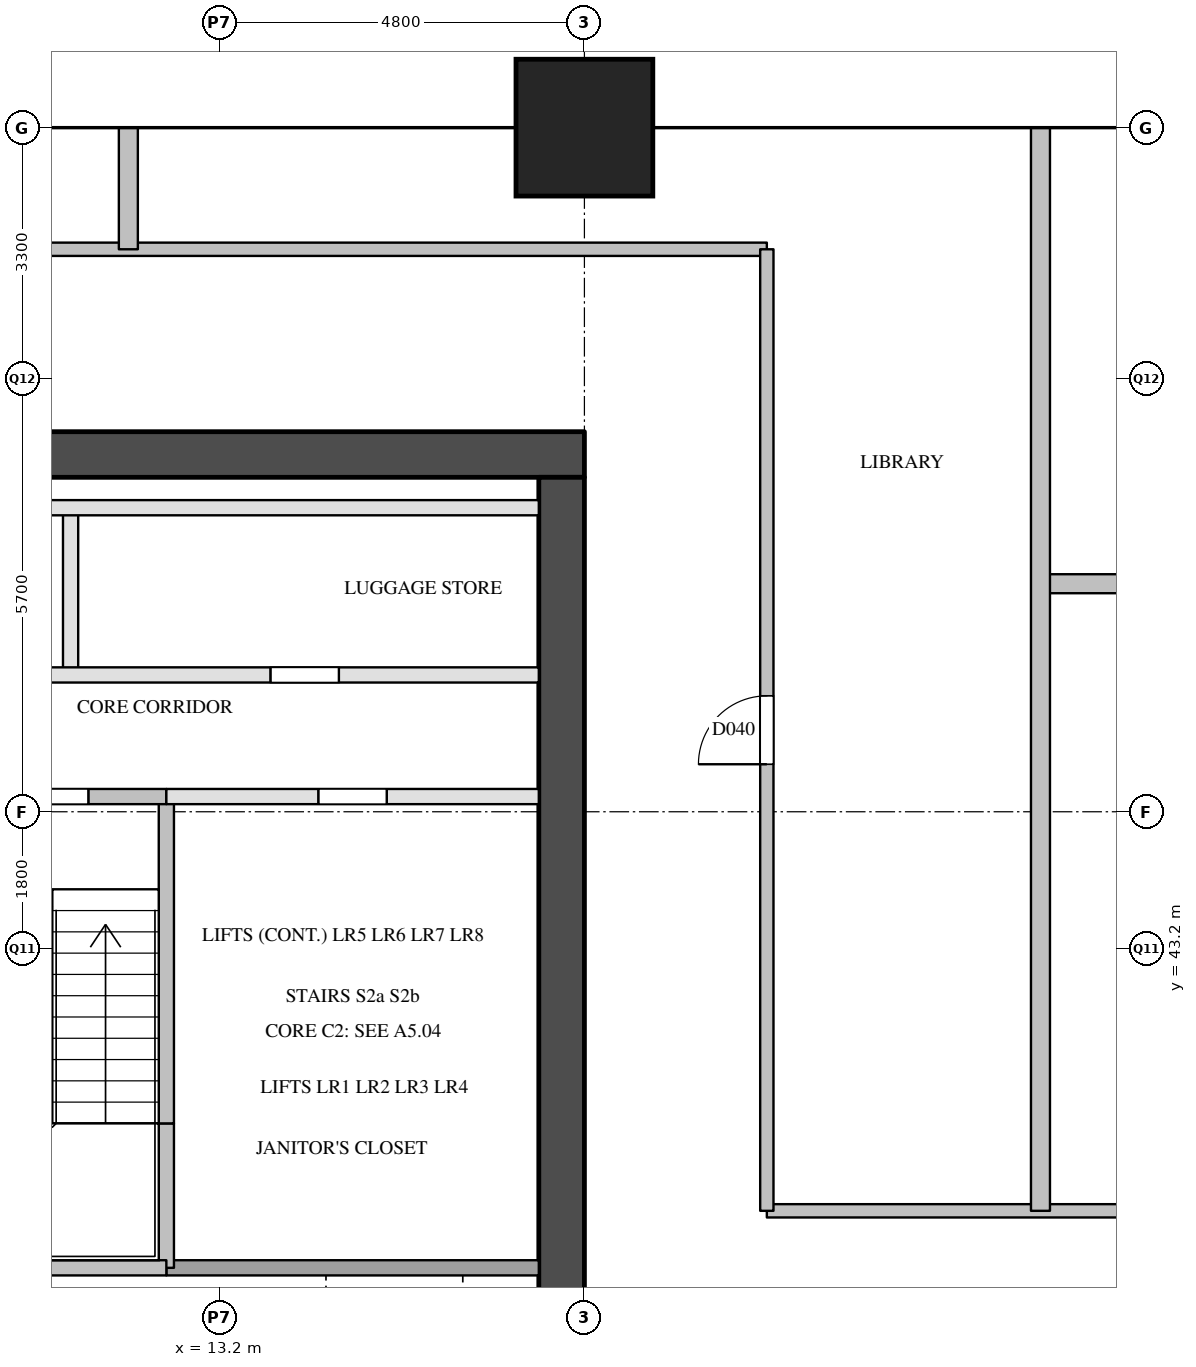
"""IFC4 building model, lengths in metres.
Left out: names, types, materials, properties, quantities, classifications, styles, units other than length and angle.
Written with IfcOpenShell. Run it as: python <this file> out.ifc"""

import sys

from ifc_helpers import new_model, si_unit, direction, frame, frame_2d, origin, origin_2d, place, context, subcontext, project, spatial, rectangle, extrude, element, fill, save


model = new_model("IFC4")
c1 = context("Model", 3, precision=1e-05, world=origin(), true_north=direction((0.0, 1.0)))
c2 = subcontext(c1, "Body", "Model", "MODEL_VIEW")
j1 = project(units=[si_unit("LENGTHUNIT", "METRE"), si_unit("PLANEANGLEUNIT", "RADIAN")], contexts=[c1])
p1 = place(None, origin())
s1 = spatial("IfcSite", under=j1, at=p1, CompositionType="ELEMENT")
p2 = place(p1, origin())
s2 = spatial("IfcBuilding", under=s1, at=p2, CompositionType="ELEMENT")
p3 = place(p2, frame((0.0, 0.0, 38.6)))
s3 = spatial("IfcBuildingStorey", under=s2, at=p3, CompositionType="ELEMENT", Elevation=38.6)
p4 = place(p3, frame((18.0, 54.0, 0.0), z_axis=(0.0, 0.0, 1.0), x_axis=(1.0, 0.0, 0.0)))
e1 = element("IfcColumn", 1, at=p4, inside=s3, PredefinedType="COLUMN", context=c2, shape_type="SweptSolid", body=[
    extrude(rectangle(XDim=1.8, YDim=1.8, at=origin_2d()), origin(), (0.0, 0.0, 1.0), 3.8),
])
p5 = place(p3, frame((5.6, 49.7, 0.0), z_axis=(0.0, 0.0, 1.0), x_axis=(1.0, 0.0, 0.0)))
e2 = element("IfcWall", 2, at=p5, inside=s3, PredefinedType="SHEAR", context=c2, shape_type="SweptSolid", body=[
    extrude(rectangle(XDim=12.4, YDim=0.6, at=frame_2d((6.2, 0.0))), origin(), (0.0, 0.0, 1.0), 3.5),
])
p6 = place(p3, frame((17.7, 29.1, 0.0), z_axis=(0.0, 0.0, 1.0), x_axis=(0.0, 1.0, 0.0)))
e3 = element("IfcWall", 3, at=p6, inside=s3, PredefinedType="SHEAR", context=c2, shape_type="SweptSolid", body=[
    extrude(rectangle(XDim=20.3, YDim=0.6, at=frame_2d((10.15, 0.0))), origin(), (0.0, 0.0, 1.0), 3.5),
])
p7 = place(p6, frame((1.25, 0.0, 0.0)))
e4 = element("IfcOpeningElement", 4, at=p7, cuts=e3, PredefinedType="OPENING", context=c2, shape_type="SweptSolid", body=[
    extrude(rectangle(XDim=0.7, YDim=2.1, at=frame_2d((0.35, 1.05))), frame((0.0, 0.31, 0.0), z_axis=(0.0, -1.0, 0.0), x_axis=(1.0, 0.0, 0.0)), (0.0, 0.0, 1.0), 0.62),
])
p8 = place(p6, frame((7.05, 0.0, 0.0)))
e5 = element("IfcOpeningElement", 5, at=p8, cuts=e3, PredefinedType="OPENING", context=c2, shape_type="SweptSolid", body=[
    extrude(rectangle(XDim=0.7, YDim=2.1, at=frame_2d((0.35, 1.05))), frame((0.0, 0.31, 0.0), z_axis=(0.0, -1.0, 0.0), x_axis=(1.0, 0.0, 0.0)), (0.0, 0.0, 1.0), 0.62),
])
p9 = place(p3, frame((11.24, 46.8, 0.0), z_axis=(0.0, 0.0, 1.0), x_axis=(0.0, 1.0, 0.0)))
e6 = element("IfcWall", 6, at=p9, inside=s3, PredefinedType="PARTITIONING", context=c2, shape_type="SweptSolid", body=[
    extrude(rectangle(XDim=2.2, YDim=0.2, at=frame_2d((1.1, 0.0))), origin(), (0.0, 0.0, 1.0), 3.5),
])
p10 = place(p3, frame((12.5, 39.0, 0.0), z_axis=(0.0, 0.0, 1.0), x_axis=(0.0, 1.0, 0.0)))
e7 = element("IfcWall", 7, at=p10, inside=s3, PredefinedType="SOLIDWALL", context=c2, shape_type="SweptSolid", body=[
    extrude(rectangle(XDim=1.9, YDim=0.2, at=frame_2d((0.95, 0.0))), origin(), (0.0, 0.0, 1.0), 3.5),
])
p11 = place(p3, frame((12.5, 40.9, 0.0), z_axis=(0.0, 0.0, 1.0), x_axis=(0.0, 1.0, 0.0)))
e8 = element("IfcWall", 8, at=p11, inside=s3, PredefinedType="SOLIDWALL", context=c2, shape_type="SweptSolid", body=[
    extrude(rectangle(XDim=4.3, YDim=0.2, at=frame_2d((2.15, 0.0))), origin(), (0.0, 0.0, 1.0), 3.5),
])
p12 = place(p3, frame((12.5, 39.0, 0.0), z_axis=(0.0, 0.0, 1.0), x_axis=(1.0, 0.0, 0.0)))
e9 = element("IfcWall", 9, at=p12, inside=s3, PredefinedType="SOLIDWALL", context=c2, shape_type="SweptSolid", body=[
    extrude(rectangle(XDim=4.9, YDim=0.2, at=frame_2d((2.45, 0.0))), origin(), (0.0, 0.0, 1.0), 3.5),
])
p13 = place(p3, frame((9.45, 39.0, 0.0), z_axis=(0.0, 0.0, 1.0), x_axis=(1.0, 0.0, 0.0)))
e10 = element("IfcWall", 10, at=p13, inside=s3, PredefinedType="SOLIDWALL", context=c2, shape_type="SweptSolid", body=[
    extrude(rectangle(XDim=3.05, YDim=0.2, at=frame_2d((1.525, 0.0))), origin(), (0.0, 0.0, 1.0), 3.5),
])
p14 = place(p3, frame((12.5, 45.2, 0.0), z_axis=(0.0, 0.0, 1.0), x_axis=(1.0, 0.0, 0.0)))
e11 = element("IfcWall", 11, at=p14, inside=s3, PredefinedType="PARTITIONING", context=c2, shape_type="SweptSolid", body=[
    extrude(rectangle(XDim=4.9, YDim=0.2, at=frame_2d((2.45, 0.0))), origin(), (0.0, 0.0, 1.0), 3.5),
])
p15 = place(p14, frame((2.0, 0.0, 0.0)))
e12 = element("IfcOpeningElement", 12, at=p15, cuts=e11, PredefinedType="OPENING", context=c2, shape_type="SweptSolid", body=[
    extrude(rectangle(XDim=0.9, YDim=2.1, at=frame_2d((0.45, 1.05))), frame((0.0, 0.11, 0.0), z_axis=(0.0, -1.0, 0.0), x_axis=(1.0, 0.0, 0.0)), (0.0, 0.0, 1.0), 0.22),
])
p16 = place(p3, frame((6.2, 45.2, 0.0), z_axis=(0.0, 0.0, 1.0), x_axis=(1.0, 0.0, 0.0)))
e13 = element("IfcWall", 13, at=p16, inside=s3, PredefinedType="SOLIDWALL", context=c2, shape_type="SweptSolid", body=[
    extrude(rectangle(XDim=6.3, YDim=0.2, at=frame_2d((3.15, 0.0))), origin(), (0.0, 0.0, 1.0), 3.5),
])
p17 = place(p16, frame((1.025, 0.0, 0.0)))
e14 = element("IfcOpeningElement", 14, at=p17, cuts=e13, PredefinedType="OPENING", context=c2, shape_type="SweptSolid", body=[
    extrude(rectangle(XDim=1.1, YDim=2.1, at=frame_2d((0.55, 1.05))), frame((0.0, 0.11, 0.0), z_axis=(0.0, -1.0, 0.0), x_axis=(1.0, 0.0, 0.0)), (0.0, 0.0, 1.0), 0.22),
])
p18 = place(p16, frame((4.175, 0.0, 0.0)))
e15 = element("IfcOpeningElement", 15, at=p18, cuts=e13, PredefinedType="OPENING", context=c2, shape_type="SweptSolid", body=[
    extrude(rectangle(XDim=1.1, YDim=2.1, at=frame_2d((0.55, 1.05))), frame((0.0, 0.11, 0.0), z_axis=(0.0, -1.0, 0.0), x_axis=(1.0, 0.0, 0.0)), (0.0, 0.0, 1.0), 0.22),
])
p19 = place(p3, frame((6.2, 46.8, 0.0), z_axis=(0.0, 0.0, 1.0), x_axis=(1.0, 0.0, 0.0)))
e16 = element("IfcWall", 16, at=p19, inside=s3, PredefinedType="PARTITIONING", context=c2, shape_type="SweptSolid", body=[
    extrude(rectangle(XDim=11.2, YDim=0.2, at=frame_2d((5.6, 0.0))), origin(), (0.0, 0.0, 1.0), 3.5),
])
p20 = place(p19, frame((2.07, 0.0, 0.0)))
e17 = element("IfcOpeningElement", 17, at=p20, cuts=e16, PredefinedType="OPENING", context=c2, shape_type="SweptSolid", body=[
    extrude(rectangle(XDim=0.9, YDim=2.1, at=frame_2d((0.45, 1.05))), frame((0.0, 0.11, 0.0), z_axis=(0.0, -1.0, 0.0), x_axis=(1.0, 0.0, 0.0)), (0.0, 0.0, 1.0), 0.22),
])
p21 = place(p19, frame((7.67, 0.0, 0.0)))
e18 = element("IfcOpeningElement", 18, at=p21, cuts=e16, PredefinedType="OPENING", context=c2, shape_type="SweptSolid", body=[
    extrude(rectangle(XDim=0.9, YDim=2.1, at=frame_2d((0.45, 1.05))), frame((0.0, 0.11, 0.0), z_axis=(0.0, -1.0, 0.0), x_axis=(1.0, 0.0, 0.0)), (0.0, 0.0, 1.0), 0.22),
])
p22 = place(p3, frame((6.2, 49.0, 0.0), z_axis=(0.0, 0.0, 1.0), x_axis=(1.0, 0.0, 0.0)))
e19 = element("IfcWall", 19, at=p22, inside=s3, PredefinedType="PARTITIONING", context=c2, shape_type="SweptSolid", body=[
    extrude(rectangle(XDim=11.2, YDim=0.2, at=frame_2d((5.6, 0.0))), origin(), (0.0, 0.0, 1.0), 3.5),
])
p23 = place(p3, frame((20.4, 39.75, 0.0), z_axis=(0.0, 0.0, 1.0), x_axis=(1.0, 0.0, 0.0)))
e20 = element("IfcWall", 20, at=p23, inside=s3, PredefinedType="PARTITIONING", context=c2, shape_type="SweptSolid", body=[
    extrude(rectangle(XDim=13.2, YDim=0.175, at=frame_2d((6.6, 0.0))), origin(), (0.0, 0.0, 1.0), 2.5),
])
p24 = place(p23, frame((7.95, 0.0, 0.0)))
e21 = element("IfcOpeningElement", 21, at=p24, cuts=e20, PredefinedType="OPENING", context=c2, shape_type="SweptSolid", body=[
    extrude(rectangle(XDim=0.9, YDim=2.1, at=frame_2d((0.45, 1.05))), frame((0.0, 0.097, 0.0), z_axis=(0.0, -1.0, 0.0), x_axis=(1.0, 0.0, 0.0)), (0.0, 0.0, 1.0), 0.195),
])
p25 = place(p3, frame((3.2, 52.4, 0.0), z_axis=(0.0, 0.0, 1.0), x_axis=(1.0, 0.0, 0.0)))
e22 = element("IfcWall", 22, at=p25, inside=s3, PredefinedType="PARTITIONING", context=c2, shape_type="SweptSolid", body=[
    extrude(rectangle(XDim=17.2, YDim=0.175, at=frame_2d((8.6, 0.0))), origin(), (0.0, 0.0, 1.0), 3.5),
])
p26 = place(p3, frame((20.4, 39.75, 0.0), z_axis=(0.0, 0.0, 1.0), x_axis=(0.0, 1.0, 0.0)))
e23 = element("IfcWall", 23, at=p26, inside=s3, PredefinedType="PARTITIONING", context=c2, shape_type="SweptSolid", body=[
    extrude(rectangle(XDim=12.65, YDim=0.175, at=frame_2d((6.325, 0.0))), origin(), (0.0, 0.0, 1.0), 3.5),
])
p27 = place(p26, frame((5.875, 0.0, 0.0)))
e24 = element("IfcOpeningElement", 24, at=p27, cuts=e23, PredefinedType="OPENING", context=c2, shape_type="SweptSolid", body=[
    extrude(rectangle(XDim=0.9, YDim=2.1, at=frame_2d((0.45, 1.05))), frame((0.0, 0.097, 0.0), z_axis=(0.0, -1.0, 0.0), x_axis=(1.0, 0.0, 0.0)), (0.0, 0.0, 1.0), 0.195),
])
p28 = place(p3, frame((24.0, 48.0, 0.0), z_axis=(0.0, 0.0, 1.0), x_axis=(1.0, 0.0, 0.0)))
e25 = element("IfcWall", 25, at=p28, inside=s3, PredefinedType="PARTITIONING", context=c2, shape_type="SweptSolid", body=[
    extrude(rectangle(XDim=9.6, YDim=0.25, at=frame_2d((4.8, 0.0))), origin(), (0.0, 0.0, 1.0), 2.5),
])
p29 = place(p3, frame((12.0, 52.4, 0.0), z_axis=(0.0, 0.0, 1.0), x_axis=(0.0, 1.0, 0.0)))
e26 = element("IfcWall", 26, at=p29, inside=s3, PredefinedType="PARTITIONING", context=c2, shape_type="SweptSolid", body=[
    extrude(rectangle(XDim=1.6, YDim=0.25, at=frame_2d((0.8, 0.0))), origin(), (0.0, 0.0, 1.0), 2.5),
])
p30 = place(p3, frame((24.0, 39.75, 0.0), z_axis=(0.0, 0.0, 1.0), x_axis=(0.0, 1.0, 0.0)))
e27 = element("IfcWall", 27, at=p30, inside=s3, PredefinedType="PARTITIONING", context=c2, shape_type="SweptSolid", body=[
    extrude(rectangle(XDim=14.25, YDim=0.25, at=frame_2d((7.125, 0.0))), origin(), (0.0, 0.0, 1.0), 2.5),
])
p31 = place(p18, origin())
e28 = element("IfcDoor", 28, at=p31, inside=s3, OperationType="SINGLE_SWING_RIGHT", PredefinedType="DOOR", context=c2, shape_type="SweptSolid", body=[
    extrude(rectangle(XDim=1.1, YDim=2.1, at=frame_2d((0.55, 1.05))), frame((0.0, 0.025, 0.0), z_axis=(0.0, -1.0, 0.0), x_axis=(1.0, 0.0, 0.0)), (0.0, 0.0, 1.0), 0.05),
])
fill(e15, e28)
p32 = place(p21, origin())
e29 = element("IfcDoor", 29, at=p32, inside=s3, OperationType="SINGLE_SWING_RIGHT", PredefinedType="DOOR", context=c2, shape_type="SweptSolid", body=[
    extrude(rectangle(XDim=0.9, YDim=2.1, at=frame_2d((0.45, 1.05))), frame((0.0, 0.025, 0.0), z_axis=(0.0, -1.0, 0.0), x_axis=(1.0, 0.0, 0.0)), (0.0, 0.0, 1.0), 0.05),
])
fill(e18, e29)
p33 = place(p15, origin())
e30 = element("IfcDoor", 30, at=p33, inside=s3, OperationType="SINGLE_SWING_RIGHT", PredefinedType="DOOR", context=c2, shape_type="SweptSolid", body=[
    extrude(rectangle(XDim=0.9, YDim=2.1, at=frame_2d((0.45, 1.05))), frame((0.0, 0.025, 0.0), z_axis=(0.0, -1.0, 0.0), x_axis=(1.0, 0.0, 0.0)), (0.0, 0.0, 1.0), 0.05),
])
fill(e12, e30)
p34 = place(p27, origin())
e31 = element("IfcDoor", 31, at=p34, inside=s3, OperationType="SINGLE_SWING_LEFT", PredefinedType="DOOR", context=c2, shape_type="SweptSolid", body=[
    extrude(rectangle(XDim=0.9, YDim=2.1, at=frame_2d((0.45, 1.05))), frame((0.0, 0.025, 0.0), z_axis=(0.0, -1.0, 0.0), x_axis=(1.0, 0.0, 0.0)), (0.0, 0.0, 1.0), 0.05),
])
fill(e24, e31)
save(model, sys.argv[1])
